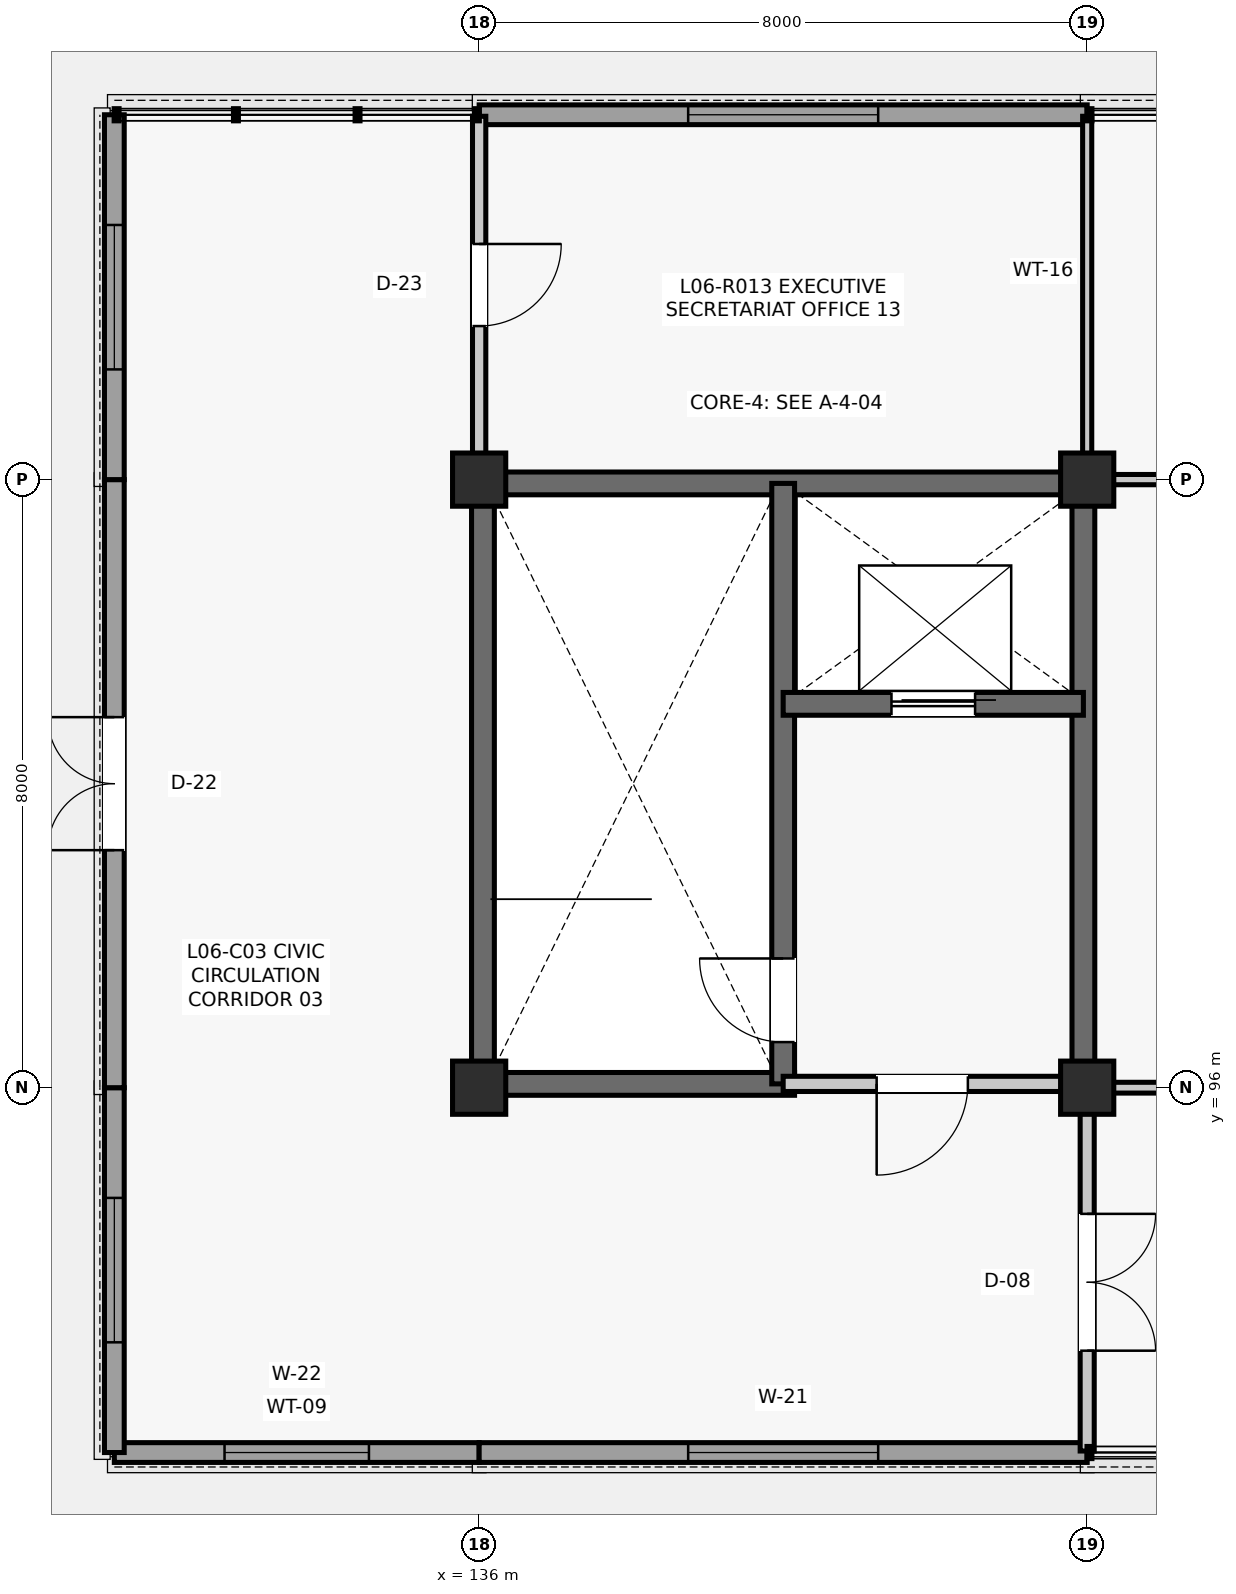
"""IFC4 building model, lengths in metres.
Left out: names, types, materials, properties, quantities, classifications, styles, units other than length and angle.
Written with IfcOpenShell. Run it as: python <this file> out.ifc"""

import sys

from ifc_helpers import new_model, si_unit, direction, frame, frame_2d, origin, origin_2d, place, context, subcontext, project, spatial, rectangle, extrude, element, fill, save


model = new_model("IFC4")
c1 = context("Model", 3, precision=1e-05, world=origin(), true_north=direction((0.0, 1.0)))
c2 = subcontext(c1, "Body", "Model", "MODEL_VIEW")
j1 = project(units=[si_unit("LENGTHUNIT", "METRE"), si_unit("PLANEANGLEUNIT", "RADIAN")], contexts=[c1])
p1 = place(None, origin())
s1 = spatial("IfcSite", under=j1, at=p1, CompositionType="ELEMENT")
p2 = place(p1, origin())
s2 = spatial("IfcBuilding", under=s1, at=p2, CompositionType="ELEMENT")
p3 = place(p2, frame((0.0, 0.0, 25.74)))
s3 = spatial("IfcBuildingStorey", under=s2, at=p3, CompositionType="ELEMENT", Elevation=25.74)
for number, where, z_axis, x_axis in (
    (1, (136.0, 96.0, 0.0), (0.0, 0.0, 1.0), (1.0, 0.0, 0.0)),
    (2, (136.0, 104.0, 0.0), (0.0, 0.0, 1.0), (1.0, 0.0, 0.0)),
    (3, (144.0, 96.0, 0.0), (0.0, 0.0, 1.0), (1.0, 0.0, 0.0)),
    (4, (144.0, 104.0, 0.0), (0.0, 0.0, 1.0), (1.0, 0.0, 0.0)),
):
    element("IfcColumn", number, at=place(p3, frame(where, z_axis=z_axis, x_axis=x_axis)), inside=s3, PredefinedType="COLUMN", context=c2, shape_type="SweptSolid", body=[
        extrude(rectangle(XDim=0.7, YDim=0.7, at=origin_2d()), origin(), (0.0, 0.0, 1.0), 4.29),
    ])
p4 = place(p3, frame((131.2, 91.2, 0.0), z_axis=(0.0, 0.0, 1.0), x_axis=(1.0, 0.0, 0.0)))
e5 = element("IfcWall", 5, at=p4, inside=s3, PredefinedType="SOLIDWALL", context=c2, shape_type="SweptSolid", body=[
    extrude(rectangle(XDim=4.8, YDim=0.26, at=frame_2d((2.4, 0.0))), origin(), (0.0, 0.0, 1.0), 4.09),
])
p5 = place(p4, frame((1.45, 0.0, 0.85)))
e6 = element("IfcOpeningElement", 6, at=p5, cuts=e5, PredefinedType="OPENING", context=c2, shape_type="SweptSolid", body=[
    extrude(rectangle(XDim=1.9, YDim=2.2, at=frame_2d((0.95, 1.1))), frame((0.0, 0.14, 0.0), z_axis=(0.0, -1.0, 0.0), x_axis=(1.0, 0.0, 0.0)), (0.0, 0.0, 1.0), 0.28),
])
p6 = place(p3, frame((136.0, 91.2, 0.0), z_axis=(0.0, 0.0, 1.0), x_axis=(1.0, 0.0, 0.0)))
e7 = element("IfcWall", 7, at=p6, inside=s3, PredefinedType="SOLIDWALL", context=c2, shape_type="SweptSolid", body=[
    extrude(rectangle(XDim=8.0, YDim=0.26, at=frame_2d((4.0, 0.0))), origin(), (0.0, 0.0, 1.0), 4.09),
])
p7 = place(p6, frame((2.75, 0.0, 0.85)))
e8 = element("IfcOpeningElement", 8, at=p7, cuts=e7, PredefinedType="OPENING", context=c2, shape_type="SweptSolid", body=[
    extrude(rectangle(XDim=2.5, YDim=2.2, at=frame_2d((1.25, 1.1))), frame((0.0, 0.14, 0.0), z_axis=(0.0, -1.0, 0.0), x_axis=(1.0, 0.0, 0.0)), (0.0, 0.0, 1.0), 0.28),
])
p8 = place(p3, frame((136.0, 108.8, 0.0), z_axis=(0.0, 0.0, 1.0), x_axis=(1.0, 0.0, 0.0)))
e9 = element("IfcWall", 9, at=p8, inside=s3, PredefinedType="SOLIDWALL", context=c2, shape_type="SweptSolid", body=[
    extrude(rectangle(XDim=8.0, YDim=0.26, at=frame_2d((4.0, 0.0))), origin(), (0.0, 0.0, 1.0), 4.09),
])
p9 = place(p8, frame((2.75, 0.0, 0.85)))
e10 = element("IfcOpeningElement", 10, at=p9, cuts=e9, PredefinedType="OPENING", context=c2, shape_type="SweptSolid", body=[
    extrude(rectangle(XDim=2.5, YDim=2.2, at=frame_2d((1.25, 1.1))), frame((0.0, 0.14, 0.0), z_axis=(0.0, -1.0, 0.0), x_axis=(1.0, 0.0, 0.0)), (0.0, 0.0, 1.0), 0.28),
])
p10 = place(p3, frame((131.2, 91.2, 0.0), z_axis=(0.0, 0.0, 1.0), x_axis=(0.0, 1.0, 0.0)))
e11 = element("IfcWall", 11, at=p10, inside=s3, PredefinedType="SOLIDWALL", context=c2, shape_type="SweptSolid", body=[
    extrude(rectangle(XDim=4.8, YDim=0.26, at=frame_2d((2.4, 0.0))), origin(), (0.0, 0.0, 1.0), 4.09),
])
p11 = place(p10, frame((1.45, 0.0, 0.85)))
e12 = element("IfcOpeningElement", 12, at=p11, cuts=e11, PredefinedType="OPENING", context=c2, shape_type="SweptSolid", body=[
    extrude(rectangle(XDim=1.9, YDim=2.2, at=frame_2d((0.95, 1.1))), frame((0.0, 0.14, 0.0), z_axis=(0.0, -1.0, 0.0), x_axis=(1.0, 0.0, 0.0)), (0.0, 0.0, 1.0), 0.28),
])
p12 = place(p3, frame((131.2, 96.0, 0.0), z_axis=(0.0, 0.0, 1.0), x_axis=(0.0, 1.0, 0.0)))
e13 = element("IfcWall", 13, at=p12, inside=s3, PredefinedType="SOLIDWALL", context=c2, shape_type="SweptSolid", body=[
    extrude(rectangle(XDim=8.0, YDim=0.26, at=frame_2d((4.0, 0.0))), origin(), (0.0, 0.0, 1.0), 4.09),
])
p13 = place(p12, frame((3.125, 0.0, 0.0)))
e14 = element("IfcOpeningElement", 14, at=p13, cuts=e13, PredefinedType="OPENING", context=c2, shape_type="SweptSolid", body=[
    extrude(rectangle(XDim=1.75, YDim=2.2, at=frame_2d((0.875, 1.1))), frame((0.0, 0.14, 0.0), z_axis=(0.0, -1.0, 0.0), x_axis=(1.0, 0.0, 0.0)), (0.0, 0.0, 1.0), 0.28),
])
p14 = place(p3, frame((131.2, 104.0, 0.0), z_axis=(0.0, 0.0, 1.0), x_axis=(0.0, 1.0, 0.0)))
e15 = element("IfcWall", 15, at=p14, inside=s3, PredefinedType="SOLIDWALL", context=c2, shape_type="SweptSolid", body=[
    extrude(rectangle(XDim=4.8, YDim=0.26, at=frame_2d((2.4, 0.0))), origin(), (0.0, 0.0, 1.0), 4.09),
])
p15 = place(p14, frame((1.45, 0.0, 0.85)))
e16 = element("IfcOpeningElement", 16, at=p15, cuts=e15, PredefinedType="OPENING", context=c2, shape_type="SweptSolid", body=[
    extrude(rectangle(XDim=1.9, YDim=2.2, at=frame_2d((0.95, 1.1))), frame((0.0, 0.14, 0.0), z_axis=(0.0, -1.0, 0.0), x_axis=(1.0, 0.0, 0.0)), (0.0, 0.0, 1.0), 0.28),
])
for number, where, z_axis, x_axis in (
    (17, (136.05, 96.24, 0.0), (0.0, 0.0, 1.0), (0.0, 1.0, 0.0)),
    (18, (136.24, 103.95, 0.0), (0.0, 0.0, 1.0), (1.0, 0.0, 0.0)),
    (19, (143.95, 96.24, 0.0), (0.0, 0.0, 1.0), (0.0, 1.0, 0.0)),
):
    element("IfcWall", number, at=place(p3, frame(where, z_axis=z_axis, x_axis=x_axis)), inside=s3, PredefinedType="SHEAR", context=c2, shape_type="SweptSolid", body=[
        extrude(rectangle(XDim=7.52, YDim=0.3, at=frame_2d((3.76, 0.0))), origin(), (0.0, 0.0, 1.0), 4.09),
    ])
p16 = place(p3, frame((136.24, 96.05, 0.0), z_axis=(0.0, 0.0, 1.0), x_axis=(1.0, 0.0, 0.0)))
e20 = element("IfcWall", 20, at=p16, inside=s3, PredefinedType="SHEAR", context=c2, shape_type="SweptSolid", body=[
    extrude(rectangle(XDim=3.91, YDim=0.3, at=frame_2d((1.955, 0.0))), origin(), (0.0, 0.0, 1.0), 4.09),
])
p17 = place(p3, frame((140.0, 96.05, 0.0), z_axis=(0.0, 0.0, 1.0), x_axis=(0.0, 1.0, 0.0)))
e21 = element("IfcWall", 21, at=p17, inside=s3, PredefinedType="SHEAR", context=c2, shape_type="SweptSolid", body=[
    extrude(rectangle(XDim=7.9, YDim=0.3, at=frame_2d((3.95, 0.0))), origin(), (0.0, 0.0, 1.0), 4.09),
])
p18 = place(p17, frame((0.55, 0.0, 0.0)))
e22 = element("IfcOpeningElement", 22, at=p18, cuts=e21, PredefinedType="OPENING", context=c2, shape_type="SweptSolid", body=[
    extrude(rectangle(XDim=1.1, YDim=2.15, at=frame_2d((0.55, 1.075))), frame((0.0, 0.16, 0.0), z_axis=(0.0, -1.0, 0.0), x_axis=(1.0, 0.0, 0.0)), (0.0, 0.0, 1.0), 0.32),
])
p19 = place(p3, frame((140.0, 101.05, 0.0), z_axis=(0.0, 0.0, 1.0), x_axis=(1.0, 0.0, 0.0)))
e23 = element("IfcWall", 23, at=p19, inside=s3, PredefinedType="SHEAR", context=c2, shape_type="SweptSolid", body=[
    extrude(rectangle(XDim=3.95, YDim=0.3, at=frame_2d((1.975, 0.0))), origin(), (0.0, 0.0, 1.0), 4.09),
])
p20 = place(p19, frame((1.425, 0.0, 0.0)))
e24 = element("IfcOpeningElement", 24, at=p20, cuts=e23, PredefinedType="OPENING", context=c2, shape_type="SweptSolid", body=[
    extrude(rectangle(XDim=1.1, YDim=2.2, at=frame_2d((0.55, 1.1))), frame((0.0, 0.16, 0.0), z_axis=(0.0, -1.0, 0.0), x_axis=(1.0, 0.0, 0.0)), (0.0, 0.0, 1.0), 0.32),
])
p21 = place(p3, frame((140.0, 96.05, 0.0), z_axis=(0.0, 0.0, 1.0), x_axis=(1.0, 0.0, 0.0)))
e25 = element("IfcWall", 25, at=p21, inside=s3, PredefinedType="PARTITIONING", context=c2, shape_type="SweptSolid", body=[
    extrude(rectangle(XDim=3.66, YDim=0.2, at=frame_2d((1.83, 0.0))), origin(), (0.0, 0.0, 1.0), 3.408),
])
p22 = place(p21, frame((1.23, 0.0, 0.0)))
e26 = element("IfcOpeningElement", 26, at=p22, cuts=e25, PredefinedType="OPENING", context=c2, shape_type="SweptSolid", body=[
    extrude(rectangle(XDim=1.2, YDim=2.15, at=frame_2d((0.6, 1.075))), frame((0.0, 0.11, 0.0), z_axis=(0.0, -1.0, 0.0), x_axis=(1.0, 0.0, 0.0)), (0.0, 0.0, 1.0), 0.22),
])
p23 = place(p3, frame((136.0, 104.34, 0.0), z_axis=(0.0, 0.0, 1.0), x_axis=(0.0, 1.0, 0.0)))
e27 = element("IfcWall", 27, at=p23, inside=s3, PredefinedType="PARTITIONING", context=c2, shape_type="SweptSolid", body=[
    extrude(rectangle(XDim=4.44, YDim=0.175, at=frame_2d((2.22, 0.0))), origin(), (0.0, 0.0, 1.0), 3.408),
])
p24 = place(p23, frame((1.68, 0.0, 0.0)))
e28 = element("IfcOpeningElement", 28, at=p24, cuts=e27, PredefinedType="OPENING", context=c2, shape_type="SweptSolid", body=[
    extrude(rectangle(XDim=1.08, YDim=2.2, at=frame_2d((0.54, 1.1))), frame((0.0, 0.097, 0.0), z_axis=(0.0, -1.0, 0.0), x_axis=(1.0, 0.0, 0.0)), (0.0, 0.0, 1.0), 0.195),
])
p25 = place(p3, frame((144.0, 91.22, 0.0), z_axis=(0.0, 0.0, 1.0), x_axis=(0.0, 1.0, 0.0)))
e29 = element("IfcWall", 29, at=p25, inside=s3, PredefinedType="PARTITIONING", context=c2, shape_type="SweptSolid", body=[
    extrude(rectangle(XDim=4.44, YDim=0.185, at=frame_2d((2.22, 0.0))), origin(), (0.0, 0.0, 1.0), 3.408),
])
p26 = place(p25, frame((1.32, 0.0, 0.0)))
e30 = element("IfcOpeningElement", 30, at=p26, cuts=e29, PredefinedType="OPENING", context=c2, shape_type="SweptSolid", body=[
    extrude(rectangle(XDim=1.8, YDim=2.35, at=frame_2d((0.9, 1.175))), frame((0.0, 0.103, 0.0), z_axis=(0.0, -1.0, 0.0), x_axis=(1.0, 0.0, 0.0)), (0.0, 0.0, 1.0), 0.205),
])
p27 = place(p3, frame((144.0, 104.34, 0.0), z_axis=(0.0, 0.0, 1.0), x_axis=(0.0, 1.0, 0.0)))
e31 = element("IfcWall", 31, at=p27, inside=s3, PredefinedType="PARTITIONING", context=c2, shape_type="SweptSolid", body=[
    extrude(rectangle(XDim=4.44, YDim=0.12, at=frame_2d((2.22, 0.0))), origin(), (0.0, 0.0, 1.0), 3.408),
])
p28 = place(p3, frame((144.34, 96.0, 0.0), z_axis=(0.0, 0.0, 1.0), x_axis=(1.0, 0.0, 0.0)))
e32 = element("IfcWall", 32, at=p28, inside=s3, PredefinedType="PARTITIONING", context=c2, shape_type="SweptSolid", body=[
    extrude(rectangle(XDim=7.37, YDim=0.142, at=frame_2d((3.685, 0.0))), origin(), (0.0, 0.0, 1.0), 3.408),
])
p29 = place(p3, frame((144.34, 104.0, 0.0), z_axis=(0.0, 0.0, 1.0), x_axis=(1.0, 0.0, 0.0)))
e33 = element("IfcWall", 33, at=p29, inside=s3, PredefinedType="PARTITIONING", context=c2, shape_type="SweptSolid", body=[
    extrude(rectangle(XDim=7.37, YDim=0.135, at=frame_2d((3.685, 0.0))), origin(), (0.0, 0.0, 1.0), 3.408),
])
p30 = place(p5, origin())
e34 = element("IfcWindow", 34, at=p30, inside=s3, PartitioningType="SINGLE_PANEL", PredefinedType="WINDOW", context=c2, shape_type="SweptSolid", body=[
    extrude(rectangle(XDim=1.9, YDim=2.2, at=frame_2d((0.95, 1.1))), frame((0.0, 0.03, 0.0), z_axis=(0.0, -1.0, 0.0), x_axis=(1.0, 0.0, 0.0)), (0.0, 0.0, 1.0), 0.06),
])
fill(e6, e34)
p31 = place(p7, origin())
e35 = element("IfcWindow", 35, at=p31, inside=s3, PartitioningType="SINGLE_PANEL", PredefinedType="WINDOW", context=c2, shape_type="SweptSolid", body=[
    extrude(rectangle(XDim=2.5, YDim=2.2, at=frame_2d((1.25, 1.1))), frame((0.0, 0.03, 0.0), z_axis=(0.0, -1.0, 0.0), x_axis=(1.0, 0.0, 0.0)), (0.0, 0.0, 1.0), 0.06),
])
fill(e8, e35)
p32 = place(p9, origin())
e36 = element("IfcWindow", 36, at=p32, inside=s3, PartitioningType="SINGLE_PANEL", PredefinedType="WINDOW", context=c2, shape_type="SweptSolid", body=[
    extrude(rectangle(XDim=2.5, YDim=2.2, at=frame_2d((1.25, 1.1))), frame((0.0, 0.03, 0.0), z_axis=(0.0, -1.0, 0.0), x_axis=(1.0, 0.0, 0.0)), (0.0, 0.0, 1.0), 0.06),
])
fill(e10, e36)
p33 = place(p11, origin())
e37 = element("IfcWindow", 37, at=p33, inside=s3, PartitioningType="SINGLE_PANEL", PredefinedType="WINDOW", context=c2, shape_type="SweptSolid", body=[
    extrude(rectangle(XDim=1.9, YDim=2.2, at=frame_2d((0.95, 1.1))), frame((0.0, 0.03, 0.0), z_axis=(0.0, -1.0, 0.0), x_axis=(1.0, 0.0, 0.0)), (0.0, 0.0, 1.0), 0.06),
])
fill(e12, e37)
p34 = place(p13, origin())
e38 = element("IfcDoor", 38, at=p34, inside=s3, OperationType="DOUBLE_DOOR_SINGLE_SWING", PredefinedType="DOOR", context=c2, shape_type="SweptSolid", body=[
    extrude(rectangle(XDim=1.75, YDim=2.2, at=frame_2d((0.875, 1.1))), frame((0.0, 0.025, 0.0), z_axis=(0.0, -1.0, 0.0), x_axis=(1.0, 0.0, 0.0)), (0.0, 0.0, 1.0), 0.05),
])
fill(e14, e38)
p35 = place(p15, origin())
e39 = element("IfcWindow", 39, at=p35, inside=s3, PartitioningType="SINGLE_PANEL", PredefinedType="WINDOW", context=c2, shape_type="SweptSolid", body=[
    extrude(rectangle(XDim=1.9, YDim=2.2, at=frame_2d((0.95, 1.1))), frame((0.0, 0.03, 0.0), z_axis=(0.0, -1.0, 0.0), x_axis=(1.0, 0.0, 0.0)), (0.0, 0.0, 1.0), 0.06),
])
fill(e16, e39)
p36 = place(p18, origin())
e40 = element("IfcDoor", 40, at=p36, inside=s3, OperationType="SINGLE_SWING_RIGHT", PredefinedType="DOOR", context=c2, shape_type="SweptSolid", body=[
    extrude(rectangle(XDim=1.1, YDim=2.15, at=frame_2d((0.55, 1.075))), frame((0.0, 0.025, 0.0), z_axis=(0.0, -1.0, 0.0), x_axis=(1.0, 0.0, 0.0)), (0.0, 0.0, 1.0), 0.05),
])
fill(e22, e40)
p37 = place(p20, origin())
e41 = element("IfcDoor", 41, at=p37, inside=s3, OperationType="SLIDING_TO_LEFT", PredefinedType="DOOR", context=c2, shape_type="SweptSolid", body=[
    extrude(rectangle(XDim=1.1, YDim=2.2, at=frame_2d((0.55, 1.1))), frame((0.0, 0.025, 0.0), z_axis=(0.0, -1.0, 0.0), x_axis=(1.0, 0.0, 0.0)), (0.0, 0.0, 1.0), 0.05),
])
fill(e24, e41)
p38 = place(p22, frame((1.2, 0.0, 0.0), z_axis=(0.0, 0.0, 1.0), x_axis=(-1.0, 0.0, 0.0)))
e42 = element("IfcDoor", 42, at=p38, inside=s3, OperationType="SINGLE_SWING_LEFT", PredefinedType="DOOR", context=c2, shape_type="SweptSolid", body=[
    extrude(rectangle(XDim=1.2, YDim=2.15, at=frame_2d((0.6, 1.075))), frame((0.0, 0.025, 0.0), z_axis=(0.0, -1.0, 0.0), x_axis=(1.0, 0.0, 0.0)), (0.0, 0.0, 1.0), 0.05),
])
fill(e26, e42)
p39 = place(p24, frame((1.08, 0.0, 0.0), z_axis=(0.0, 0.0, 1.0), x_axis=(-1.0, 0.0, 0.0)))
e43 = element("IfcDoor", 43, at=p39, inside=s3, OperationType="SINGLE_SWING_RIGHT", PredefinedType="DOOR", context=c2, shape_type="SweptSolid", body=[
    extrude(rectangle(XDim=1.08, YDim=2.2, at=frame_2d((0.54, 1.1))), frame((0.0, 0.025, 0.0), z_axis=(0.0, -1.0, 0.0), x_axis=(1.0, 0.0, 0.0)), (0.0, 0.0, 1.0), 0.05),
])
fill(e28, e43)
p40 = place(p26, frame((1.8, 0.0, 0.0), z_axis=(0.0, 0.0, 1.0), x_axis=(-1.0, 0.0, 0.0)))
e44 = element("IfcDoor", 44, at=p40, inside=s3, OperationType="DOUBLE_DOOR_SINGLE_SWING", PredefinedType="DOOR", context=c2, shape_type="SweptSolid", body=[
    extrude(rectangle(XDim=1.8, YDim=2.35, at=frame_2d((0.9, 1.175))), frame((0.0, 0.025, 0.0), z_axis=(0.0, -1.0, 0.0), x_axis=(1.0, 0.0, 0.0)), (0.0, 0.0, 1.0), 0.05),
])
fill(e30, e44)
save(model, sys.argv[1])
